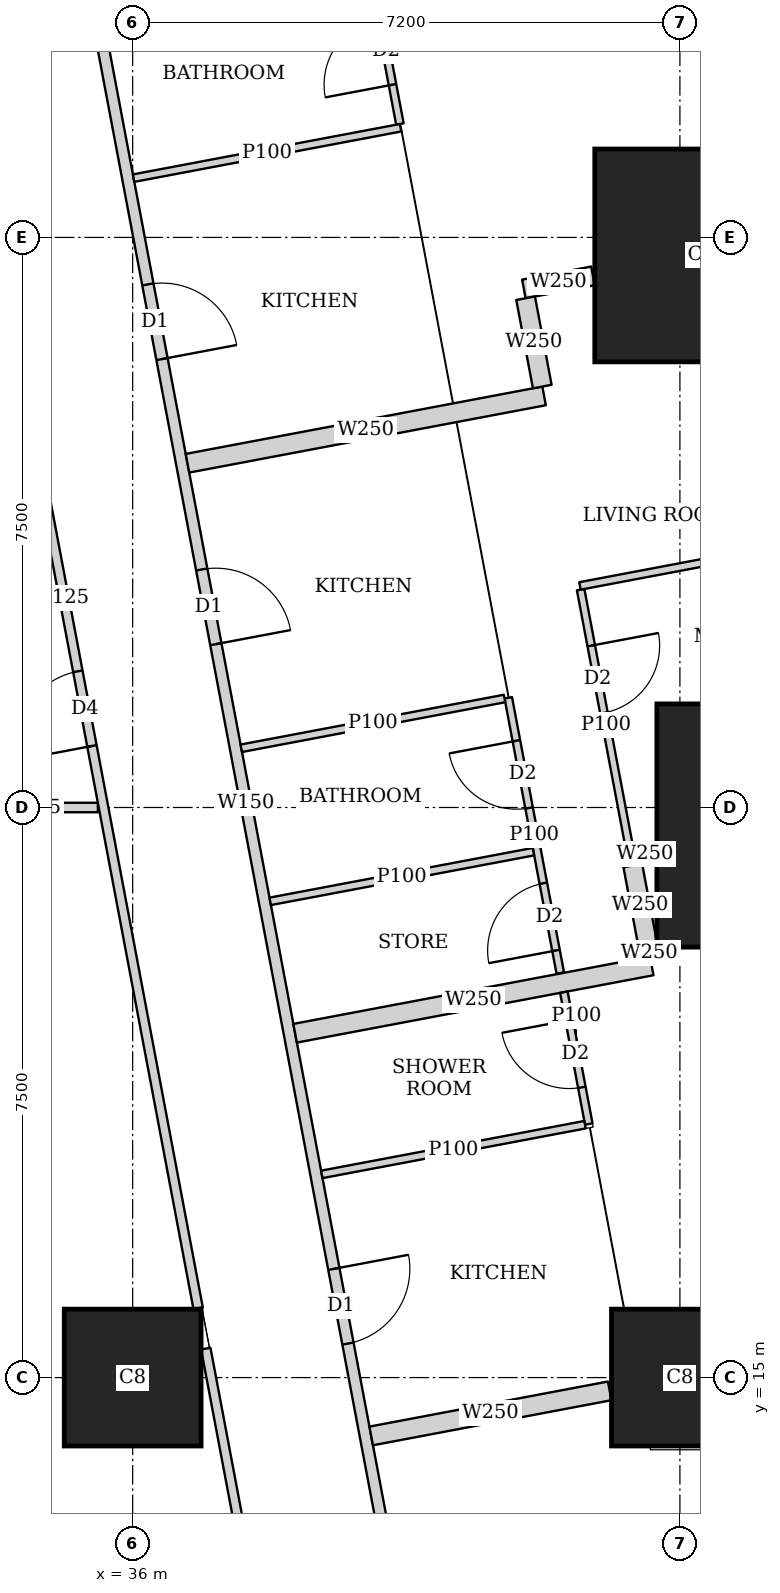
"""IFC4 building model, lengths in metres.
Left out: names, types, materials, properties, quantities, classifications, styles, units other than length and angle.
Written with IfcOpenShell. Run it as: python <this file> out.ifc"""

import sys

from ifc_helpers import new_model, si_unit, direction, frame, frame_2d, origin, origin_2d, place, context, subcontext, project, spatial, rectangle, extrude, element, fill, save


model = new_model("IFC4")
c1 = context("Model", 3, precision=1e-05, world=origin(), true_north=direction((0.0, 1.0)))
c2 = subcontext(c1, "Body", "Model", "MODEL_VIEW")
j1 = project(units=[si_unit("LENGTHUNIT", "METRE"), si_unit("PLANEANGLEUNIT", "RADIAN")], contexts=[c1])
p1 = place(None, origin())
s1 = spatial("IfcSite", under=j1, at=p1, CompositionType="ELEMENT")
p2 = place(p1, origin())
s2 = spatial("IfcBuilding", under=s1, at=p2, CompositionType="ELEMENT")
p3 = place(p2, frame((0.0, 0.0, 65.0)))
s3 = spatial("IfcBuildingStorey", under=s2, at=p3, CompositionType="ELEMENT", Elevation=65.0)
for number, where, z_axis, x_axis in (
    (1, (36.0, 15.0, 0.0), (0.0, 0.0, 1.0), (1.0, 0.0, 0.0)),
    (2, (43.2, 15.0, 0.0), (0.0, 0.0, 1.0), (1.0, 0.0, 0.0)),
):
    element("IfcColumn", number, at=place(p3, frame(where, z_axis=z_axis, x_axis=x_axis)), inside=s3, PredefinedType="COLUMN", context=c2, shape_type="SweptSolid", body=[
        extrude(rectangle(XDim=1.8, YDim=1.8, at=origin_2d()), origin(), (0.0, 0.0, 1.0), 3.75),
    ])
p4 = place(p3, frame((44.697, 22.263, 0.0), z_axis=(0.0, 0.0, 1.0), x_axis=(1.0, 0.0, 0.0)))
e3 = element("IfcColumn", 3, at=p4, inside=s3, PredefinedType="COLUMN", context=c2, shape_type="SweptSolid", body=[
    extrude(rectangle(XDim=3.6, YDim=3.2, at=origin_2d()), origin(), (0.0, 0.0, 1.0), 3.75),
])
p5 = place(p3, frame((43.48, 29.763, 0.0), z_axis=(0.0, 0.0, 1.0), x_axis=(1.0, 0.0, 0.0)))
e4 = element("IfcColumn", 4, at=p5, inside=s3, PredefinedType="COLUMN", context=c2, shape_type="SweptSolid", body=[
    extrude(rectangle(XDim=2.8, YDim=2.8, at=origin_2d()), origin(), (0.0, 0.0, 1.0), 3.75),
])
p6 = place(p3, frame((50.653, 2.703, 0.0), z_axis=(0.0, 0.0, 1.0), x_axis=(-0.185612026696, 0.982623109613, 0.0)))
e5 = element("IfcWall", 5, at=p6, inside=s3, PredefinedType="SOLIDWALL", context=c2, shape_type="SweptSolid", body=[
    extrude(rectangle(XDim=41.393, YDim=0.2, at=frame_2d((20.697, 0.0))), origin(), (0.0, 0.0, 1.0), 3.5),
])
p7 = place(p6, frame((1.633, 0.0, 0.9)))
e6 = element("IfcOpeningElement", 6, at=p7, cuts=e5, PredefinedType="OPENING", context=c2, shape_type="SweptSolid", body=[
    extrude(rectangle(XDim=1.8, YDim=1.5, at=frame_2d((0.9, 0.75))), frame((0.0, 0.11, 0.0), z_axis=(0.0, -1.0, 0.0), x_axis=(1.0, 0.0, 0.0)), (0.0, 0.0, 1.0), 0.22),
])
p8 = place(p6, frame((6.032, 0.0, 0.9)))
e7 = element("IfcOpeningElement", 7, at=p8, cuts=e5, PredefinedType="OPENING", context=c2, shape_type="SweptSolid", body=[
    extrude(rectangle(XDim=1.8, YDim=1.5, at=frame_2d((0.9, 0.75))), frame((0.0, 0.11, 0.0), z_axis=(0.0, -1.0, 0.0), x_axis=(1.0, 0.0, 0.0)), (0.0, 0.0, 1.0), 0.22),
])
p9 = place(p6, frame((9.848, 0.0, 0.9)))
e8 = element("IfcOpeningElement", 8, at=p9, cuts=e5, PredefinedType="OPENING", context=c2, shape_type="SweptSolid", body=[
    extrude(rectangle(XDim=1.8, YDim=1.5, at=frame_2d((0.9, 0.75))), frame((0.0, 0.11, 0.0), z_axis=(0.0, -1.0, 0.0), x_axis=(1.0, 0.0, 0.0)), (0.0, 0.0, 1.0), 0.22),
])
p10 = place(p6, frame((17.481, 0.0, 0.9)))
e9 = element("IfcOpeningElement", 9, at=p10, cuts=e5, PredefinedType="OPENING", context=c2, shape_type="SweptSolid", body=[
    extrude(rectangle(XDim=1.8, YDim=1.5, at=frame_2d((0.9, 0.75))), frame((0.0, 0.11, 0.0), z_axis=(0.0, -1.0, 0.0), x_axis=(1.0, 0.0, 0.0)), (0.0, 0.0, 1.0), 0.22),
])
p11 = place(p6, frame((21.297, 0.0, 0.9)))
e10 = element("IfcOpeningElement", 10, at=p11, cuts=e5, PredefinedType="OPENING", context=c2, shape_type="SweptSolid", body=[
    extrude(rectangle(XDim=1.8, YDim=1.5, at=frame_2d((0.9, 0.75))), frame((0.0, 0.11, 0.0), z_axis=(0.0, -1.0, 0.0), x_axis=(1.0, 0.0, 0.0)), (0.0, 0.0, 1.0), 0.22),
])
p12 = place(p6, frame((25.113, 0.0, 0.9)))
e11 = element("IfcOpeningElement", 11, at=p12, cuts=e5, PredefinedType="OPENING", context=c2, shape_type="SweptSolid", body=[
    extrude(rectangle(XDim=1.8, YDim=1.5, at=frame_2d((0.9, 0.75))), frame((0.0, 0.11, 0.0), z_axis=(0.0, -1.0, 0.0), x_axis=(1.0, 0.0, 0.0)), (0.0, 0.0, 1.0), 0.22),
])
p13 = place(p6, frame((28.93, 0.0, 0.9)))
e12 = element("IfcOpeningElement", 12, at=p13, cuts=e5, PredefinedType="OPENING", context=c2, shape_type="SweptSolid", body=[
    extrude(rectangle(XDim=1.8, YDim=1.5, at=frame_2d((0.9, 0.75))), frame((0.0, 0.11, 0.0), z_axis=(0.0, -1.0, 0.0), x_axis=(1.0, 0.0, 0.0)), (0.0, 0.0, 1.0), 0.22),
])
p14 = place(p6, frame((32.746, 0.0, 0.9)))
e13 = element("IfcOpeningElement", 13, at=p14, cuts=e5, PredefinedType="OPENING", context=c2, shape_type="SweptSolid", body=[
    extrude(rectangle(XDim=1.8, YDim=1.5, at=frame_2d((0.9, 0.75))), frame((0.0, 0.11, 0.0), z_axis=(0.0, -1.0, 0.0), x_axis=(1.0, 0.0, 0.0)), (0.0, 0.0, 1.0), 0.22),
])
p15 = place(p6, frame((36.481, 0.0, 0.9)))
e14 = element("IfcOpeningElement", 14, at=p15, cuts=e5, PredefinedType="OPENING", context=c2, shape_type="SweptSolid", body=[
    extrude(rectangle(XDim=1.8, YDim=1.5, at=frame_2d((0.9, 0.75))), frame((0.0, 0.11, 0.0), z_axis=(0.0, -1.0, 0.0), x_axis=(1.0, 0.0, 0.0)), (0.0, 0.0, 1.0), 0.22),
])
p16 = place(p3, frame((33.68, 42.723, 0.0), z_axis=(0.0, 0.0, 1.0), x_axis=(0.185624129307, -0.98262082342, 0.0)))
e15 = element("IfcWall", 15, at=p16, inside=s3, PredefinedType="SOLIDWALL", context=c2, shape_type="SweptSolid", body=[
    extrude(rectangle(XDim=41.051, YDim=0.15, at=frame_2d((20.526, 0.0))), origin(), (0.0, 0.0, 1.0), 2.5),
])
p17 = place(p16, frame((13.577, 0.0, 0.0)))
e16 = element("IfcOpeningElement", 16, at=p17, cuts=e15, PredefinedType="OPENING", context=c2, shape_type="SweptSolid", body=[
    extrude(rectangle(XDim=1.0, YDim=2.1, at=frame_2d((0.5, 1.05))), frame((0.0, 0.085, 0.0), z_axis=(0.0, -1.0, 0.0), x_axis=(1.0, 0.0, 0.0)), (0.0, 0.0, 1.0), 0.17),
])
p18 = place(p16, frame((17.394, 0.0, 0.0)))
e17 = element("IfcOpeningElement", 17, at=p18, cuts=e15, PredefinedType="OPENING", context=c2, shape_type="SweptSolid", body=[
    extrude(rectangle(XDim=1.0, YDim=2.1, at=frame_2d((0.5, 1.05))), frame((0.0, 0.085, 0.0), z_axis=(0.0, -1.0, 0.0), x_axis=(1.0, 0.0, 0.0)), (0.0, 0.0, 1.0), 0.17),
])
p19 = place(p16, frame((26.758, 0.0, 0.0)))
e18 = element("IfcOpeningElement", 18, at=p19, cuts=e15, PredefinedType="OPENING", context=c2, shape_type="SweptSolid", body=[
    extrude(rectangle(XDim=1.0, YDim=2.1, at=frame_2d((0.5, 1.05))), frame((0.0, 0.085, 0.0), z_axis=(0.0, -1.0, 0.0), x_axis=(1.0, 0.0, 0.0)), (0.0, 0.0, 1.0), 0.17),
])
p20 = place(p16, frame((32.193, 0.0, 0.0)))
e19 = element("IfcOpeningElement", 19, at=p20, cuts=e15, PredefinedType="OPENING", context=c2, shape_type="SweptSolid", body=[
    extrude(rectangle(XDim=1.0, YDim=2.1, at=frame_2d((0.5, 1.05))), frame((0.0, 0.085, 0.0), z_axis=(0.0, -1.0, 0.0), x_axis=(1.0, 0.0, 0.0)), (0.0, 0.0, 1.0), 0.17),
])
p21 = place(p3, frame((37.515, 42.089, 0.0), z_axis=(0.0, 0.0, 1.0), x_axis=(0.185565000991, -0.982631991341, 0.0)))
e20 = element("IfcWall", 20, at=p21, inside=s3, PredefinedType="PARTITIONING", context=c2, shape_type="SweptSolid", body=[
    extrude(rectangle(XDim=10.784, YDim=0.1, at=frame_2d((5.392, 0.0))), origin(), (0.0, 0.0, 1.0), 3.5),
])
p22 = place(p21, frame((9.358, 0.0, 0.0)))
e21 = element("IfcOpeningElement", 21, at=p22, cuts=e20, PredefinedType="OPENING", context=c2, shape_type="SweptSolid", body=[
    extrude(rectangle(XDim=0.9, YDim=2.1, at=frame_2d((0.45, 1.05))), frame((0.0, 0.06, 0.0), z_axis=(0.0, -1.0, 0.0), x_axis=(1.0, 0.0, 0.0)), (0.0, 0.0, 1.0), 0.12),
])
p23 = place(p21, frame((5.173, 0.0, 0.0)))
e22 = element("IfcOpeningElement", 22, at=p23, cuts=e20, PredefinedType="OPENING", context=c2, shape_type="SweptSolid", body=[
    extrude(rectangle(XDim=0.9, YDim=2.1, at=frame_2d((0.45, 1.05))), frame((0.0, 0.06, 0.0), z_axis=(0.0, -1.0, 0.0), x_axis=(1.0, 0.0, 0.0)), (0.0, 0.0, 1.0), 0.12),
])
p24 = place(p21, frame((2.629, 0.0, 0.0)))
e23 = element("IfcOpeningElement", 23, at=p24, cuts=e20, PredefinedType="OPENING", context=c2, shape_type="SweptSolid", body=[
    extrude(rectangle(XDim=0.9, YDim=2.1, at=frame_2d((0.45, 1.05))), frame((0.0, 0.06, 0.0), z_axis=(0.0, -1.0, 0.0), x_axis=(1.0, 0.0, 0.0)), (0.0, 0.0, 1.0), 0.12),
])
p25 = place(p21, frame((7.451, 0.0, 0.0)))
e24 = element("IfcOpeningElement", 24, at=p25, cuts=e20, PredefinedType="OPENING", context=c2, shape_type="SweptSolid", body=[
    extrude(rectangle(XDim=0.9, YDim=2.1, at=frame_2d((0.45, 1.05))), frame((0.0, 0.06, 0.0), z_axis=(0.0, -1.0, 0.0), x_axis=(1.0, 0.0, 0.0)), (0.0, 0.0, 1.0), 0.12),
])
p26 = place(p3, frame((39.525, 31.443, 0.0), z_axis=(0.0, 0.0, 1.0), x_axis=(-0.982648035033, -0.185480023848, 0.0)))
e25 = element("IfcWall", 25, at=p26, inside=s3, PredefinedType="PARTITIONING", context=c2, shape_type="SweptSolid", body=[
    extrude(rectangle(XDim=3.575, YDim=0.1, at=frame_2d((1.788, 0.0))), origin(), (0.0, 0.0, 1.0), 3.5),
])
p27 = place(p3, frame((41.894, 25.366, 0.0), z_axis=(0.0, 0.0, 1.0), x_axis=(0.185611839851, -0.982623144907, 0.0)))
e26 = element("IfcWall", 26, at=p27, inside=s3, PredefinedType="PARTITIONING", context=c2, shape_type="SweptSolid", body=[
    extrude(rectangle(XDim=3.62, YDim=0.1, at=frame_2d((1.81, 0.0))), origin(), (0.0, 0.0, 1.0), 2.5),
])
p28 = place(p27, frame((0.75, 0.0, 0.0)))
e27 = element("IfcOpeningElement", 27, at=p28, cuts=e26, PredefinedType="OPENING", context=c2, shape_type="SweptSolid", body=[
    extrude(rectangle(XDim=0.9, YDim=2.1, at=frame_2d((0.45, 1.05))), frame((0.0, 0.06, 0.0), z_axis=(0.0, -1.0, 0.0), x_axis=(1.0, 0.0, 0.0)), (0.0, 0.0, 1.0), 0.12),
])
p29 = place(p3, frame((40.942, 23.943, 0.0), z_axis=(0.0, 0.0, 1.0), x_axis=(0.185632361754, -0.982619268216, 0.0)))
e28 = element("IfcWall", 28, at=p29, inside=s3, PredefinedType="PARTITIONING", context=c2, shape_type="SweptSolid", body=[
    extrude(rectangle(XDim=3.685, YDim=0.1, at=frame_2d((1.843, 0.0))), origin(), (0.0, 0.0, 1.0), 2.5),
])
p30 = place(p29, frame((0.575, 0.0, 0.0)))
e29 = element("IfcOpeningElement", 29, at=p30, cuts=e28, PredefinedType="OPENING", context=c2, shape_type="SweptSolid", body=[
    extrude(rectangle(XDim=0.9, YDim=2.1, at=frame_2d((0.45, 1.05))), frame((0.0, 0.06, 0.0), z_axis=(0.0, -1.0, 0.0), x_axis=(1.0, 0.0, 0.0)), (0.0, 0.0, 1.0), 0.12),
])
p31 = place(p29, frame((2.483, 0.0, 0.0)))
e30 = element("IfcOpeningElement", 30, at=p31, cuts=e28, PredefinedType="OPENING", context=c2, shape_type="SweptSolid", body=[
    extrude(rectangle(XDim=0.9, YDim=2.1, at=frame_2d((0.45, 1.05))), frame((0.0, 0.06, 0.0), z_axis=(0.0, -1.0, 0.0), x_axis=(1.0, 0.0, 0.0)), (0.0, 0.0, 1.0), 0.12),
])
p32 = place(p3, frame((46.11, 26.213, 0.0), z_axis=(0.0, 0.0, 1.0), x_axis=(-0.982633535512, -0.185556823879, 0.0)))
e31 = element("IfcWall", 31, at=p32, inside=s3, PredefinedType="PARTITIONING", context=c2, shape_type="SweptSolid", body=[
    extrude(rectangle(XDim=4.3, YDim=0.1, at=frame_2d((2.15, 0.0))), origin(), (0.0, 0.0, 1.0), 2.05),
])
p33 = place(p3, frame((40.893, 23.934, 0.0), z_axis=(0.0, 0.0, 1.0), x_axis=(-0.982588017646, -0.185797706064, 0.0)))
e32 = element("IfcWall", 32, at=p33, inside=s3, PredefinedType="PARTITIONING", context=c2, shape_type="SweptSolid", body=[
    extrude(rectangle(XDim=3.525, YDim=0.1, at=frame_2d((1.763, 0.0))), origin(), (0.0, 0.0, 1.0), 3.5),
])
p34 = place(p3, frame((41.273, 21.919, 0.0), z_axis=(0.0, 0.0, 1.0), x_axis=(-0.982636169624, -0.185542874149, 0.0)))
e33 = element("IfcWall", 33, at=p34, inside=s3, PredefinedType="PARTITIONING", context=c2, shape_type="SweptSolid", body=[
    extrude(rectangle(XDim=3.525, YDim=0.1, at=frame_2d((1.763, 0.0))), origin(), (0.0, 0.0, 1.0), 2.5),
])
p35 = place(p3, frame((42.056, 29.494, 0.0), z_axis=(0.0, 0.0, 1.0), x_axis=(-0.982587178881, -0.185802141803, 0.0)))
e34 = element("IfcWall", 34, at=p35, inside=s3, PredefinedType="SOLIDWALL", context=c2, shape_type="SweptSolid", body=[
    extrude(rectangle(XDim=0.925, YDim=0.25, at=frame_2d((0.462, 0.0))), origin(), (0.0, 0.0, 1.0), 2.5),
])
p36 = place(p3, frame((41.413, 27.915, 0.0), z_axis=(0.0, 0.0, 1.0), x_axis=(-0.982635807605, -0.185544791394, 0.0)))
e35 = element("IfcWall", 35, at=p36, inside=s3, PredefinedType="SOLIDWALL", context=c2, shape_type="SweptSolid", body=[
    extrude(rectangle(XDim=4.775, YDim=0.25, at=frame_2d((2.388, 0.0))), origin(), (0.0, 0.0, 1.0), 3.5),
])
p37 = place(p3, frame((41.17, 29.2, 0.0), z_axis=(0.0, 0.0, 1.0), x_axis=(0.185223510709, -0.982696418575, 0.0)))
e36 = element("IfcWall", 36, at=p37, inside=s3, PredefinedType="SOLIDWALL", context=c2, shape_type="SweptSolid", body=[
    extrude(rectangle(XDim=1.182, YDim=0.25, at=frame_2d((0.591, 0.0))), origin(), (0.0, 0.0, 1.0), 2.5),
])
p38 = place(p3, frame((41.673, 20.07, 0.0), z_axis=(0.0, 0.0, 1.0), x_axis=(0.185783379659, -0.98259072652, 0.0)))
e37 = element("IfcWall", 37, at=p38, inside=s3, PredefinedType="PARTITIONING", context=c2, shape_type="SweptSolid", body=[
    extrude(rectangle(XDim=1.765, YDim=0.1, at=frame_2d((0.882, 0.0))), origin(), (0.0, 0.0, 1.0), 3.5),
])
p39 = place(p38, frame((0.374, 0.0, 0.0)))
e38 = element("IfcOpeningElement", 38, at=p39, cuts=e37, PredefinedType="OPENING", context=c2, shape_type="SweptSolid", body=[
    extrude(rectangle(XDim=0.9, YDim=2.1, at=frame_2d((0.45, 1.05))), frame((0.0, 0.06, 0.0), z_axis=(0.0, -1.0, 0.0), x_axis=(1.0, 0.0, 0.0)), (0.0, 0.0, 1.0), 0.12),
])
p40 = place(p3, frame((41.952, 18.327, 0.0), z_axis=(0.0, 0.0, 1.0), x_axis=(-0.982648794755, -0.185475998897, 0.0)))
e39 = element("IfcWall", 39, at=p40, inside=s3, PredefinedType="PARTITIONING", context=c2, shape_type="SweptSolid", body=[
    extrude(rectangle(XDim=3.525, YDim=0.1, at=frame_2d((1.763, 0.0))), origin(), (0.0, 0.0, 1.0), 3.5),
])
p41 = place(p3, frame((42.873, 21.918, 0.0), z_axis=(0.0, 0.0, 1.0), x_axis=(-0.982892522967, -0.184180043152, 0.0)))
e40 = element("IfcWall", 40, at=p41, inside=s3, PredefinedType="SOLIDWALL", context=c2, shape_type="SweptSolid", body=[
    extrude(rectangle(XDim=0.272, YDim=0.25, at=frame_2d((0.136, 0.0))), origin(), (0.0, 0.0, 1.0), 2.5),
])
p42 = place(p3, frame((42.829, 20.416, 0.0), z_axis=(0.0, 0.0, 1.0), x_axis=(-0.982635807605, -0.185544791394, 0.0)))
e41 = element("IfcWall", 41, at=p42, inside=s3, PredefinedType="SOLIDWALL", context=c2, shape_type="SweptSolid", body=[
    extrude(rectangle(XDim=4.775, YDim=0.25, at=frame_2d((2.388, 0.0))), origin(), (0.0, 0.0, 1.0), 3.5),
])
p43 = place(p3, frame((42.58, 21.736, 0.0), z_axis=(0.0, 0.0, 1.0), x_axis=(0.185458925981, -0.982652017132, 0.0)))
e42 = element("IfcWall", 42, at=p43, inside=s3, PredefinedType="SOLIDWALL", context=c2, shape_type="SweptSolid", body=[
    extrude(rectangle(XDim=1.045, YDim=0.25, at=frame_2d((0.522, 0.0))), origin(), (0.0, 0.0, 1.0), 2.5),
])
p44 = place(p3, frame((42.787, 20.639, 0.0), z_axis=(0.0, 0.0, 1.0), x_axis=(0.185013851593, -0.982735913009, 0.0)))
e43 = element("IfcWall", 43, at=p44, inside=s3, PredefinedType="SOLIDWALL", context=c2, shape_type="SweptSolid", body=[
    extrude(rectangle(XDim=0.102, YDim=0.25, at=frame_2d((0.051, 0.0))), origin(), (0.0, 0.0, 1.0), 3.5),
])
p45 = place(p3, frame((42.276, 14.825, 0.0), z_axis=(0.0, 0.0, 1.0), x_axis=(-0.982607211054, -0.185696173318, 0.0)))
e44 = element("IfcWall", 44, at=p45, inside=s3, PredefinedType="SOLIDWALL", context=c2, shape_type="SweptSolid", body=[
    extrude(rectangle(XDim=3.194, YDim=0.25, at=frame_2d((1.597, 0.0))), origin(), (0.0, 0.0, 1.0), 3.5),
])
p46 = place(p3, frame((37.9, 10.413, 0.0), z_axis=(0.0, 0.0, 1.0), x_axis=(-0.185527510388, 0.982639070508, 0.0)))
e45 = element("IfcWall", 45, at=p46, inside=s3, PredefinedType="PARTITIONING", context=c2, shape_type="SweptSolid", body=[
    extrude(rectangle(XDim=5.056, YDim=0.125, at=frame_2d((2.528, 0.0))), origin(), (0.0, 0.0, 1.0), 3.5),
])
p47 = place(p46, frame((0.708, 0.0, 0.0)))
e46 = element("IfcOpeningElement", 46, at=p47, cuts=e45, PredefinedType="OPENING", context=c2, shape_type="SweptSolid", body=[
    extrude(rectangle(XDim=1.0, YDim=2.1, at=frame_2d((0.5, 1.05))), frame((0.0, 0.073, 0.0), z_axis=(0.0, -1.0, 0.0), x_axis=(1.0, 0.0, 0.0)), (0.0, 0.0, 1.0), 0.145),
])
p48 = place(p3, frame((36.861, 15.913, 0.0), z_axis=(0.0, 0.0, 1.0), x_axis=(-0.185588307143, 0.982627589808, 0.0)))
e47 = element("IfcWall", 47, at=p48, inside=s3, PredefinedType="PARTITIONING", context=c2, shape_type="SweptSolid", body=[
    extrude(rectangle(XDim=19.005, YDim=0.125, at=frame_2d((9.502, 0.0))), origin(), (0.0, 0.0, 1.0), 2.5),
])
p49 = place(p48, frame((7.527, 0.0, 0.0)))
e48 = element("IfcOpeningElement", 48, at=p49, cuts=e47, PredefinedType="OPENING", context=c2, shape_type="SweptSolid", body=[
    extrude(rectangle(XDim=1.0, YDim=2.1, at=frame_2d((0.5, 1.05))), frame((0.0, 0.073, 0.0), z_axis=(0.0, -1.0, 0.0), x_axis=(1.0, 0.0, 0.0)), (0.0, 0.0, 1.0), 0.145),
])
p50 = place(p48, frame((15.5, 0.0, 0.0)))
e49 = element("IfcOpeningElement", 49, at=p50, cuts=e47, PredefinedType="OPENING", context=c2, shape_type="SweptSolid", body=[
    extrude(rectangle(XDim=1.0, YDim=2.1, at=frame_2d((0.5, 1.05))), frame((0.0, 0.073, 0.0), z_axis=(0.0, -1.0, 0.0), x_axis=(1.0, 0.0, 0.0)), (0.0, 0.0, 1.0), 0.145),
])
p51 = place(p48, frame((17.602, 0.0, 0.0)))
e50 = element("IfcOpeningElement", 50, at=p51, cuts=e47, PredefinedType="OPENING", context=c2, shape_type="SweptSolid", body=[
    extrude(rectangle(XDim=1.0, YDim=2.1, at=frame_2d((0.5, 1.05))), frame((0.0, 0.073, 0.0), z_axis=(0.0, -1.0, 0.0), x_axis=(1.0, 0.0, 0.0)), (0.0, 0.0, 1.0), 0.145),
])
p52 = place(p3, frame((33.901, 22.5, 0.0), z_axis=(0.0, 0.0, 1.0), x_axis=(1.0, 0.0, 0.0)))
e51 = element("IfcWall", 51, at=p52, inside=s3, PredefinedType="PARTITIONING", context=c2, shape_type="SweptSolid", body=[
    extrude(rectangle(XDim=1.641, YDim=0.125, at=frame_2d((0.821, 0.0))), origin(), (0.0, 0.0, 1.0), 2.5),
])
p53 = place(p22, origin())
e52 = element("IfcDoor", 52, at=p53, inside=s3, OperationType="SINGLE_SWING_LEFT", PredefinedType="DOOR", context=c2, shape_type="SweptSolid", body=[
    extrude(rectangle(XDim=0.9, YDim=2.1, at=frame_2d((0.45, 1.05))), frame((0.0, 0.025, 0.0), z_axis=(0.0, -1.0, 0.0), x_axis=(1.0, 0.0, 0.0)), (0.0, 0.0, 1.0), 0.05),
])
fill(e21, e52)
p54 = place(p17, origin())
e53 = element("IfcDoor", 53, at=p54, inside=s3, OperationType="SINGLE_SWING_RIGHT", PredefinedType="DOOR", context=c2, shape_type="SweptSolid", body=[
    extrude(rectangle(XDim=1.0, YDim=2.1, at=frame_2d((0.5, 1.05))), frame((0.0, 0.025, 0.0), z_axis=(0.0, -1.0, 0.0), x_axis=(1.0, 0.0, 0.0)), (0.0, 0.0, 1.0), 0.05),
])
fill(e16, e53)
p55 = place(p28, origin())
e54 = element("IfcDoor", 54, at=p55, inside=s3, OperationType="SINGLE_SWING_LEFT", PredefinedType="DOOR", context=c2, shape_type="SweptSolid", body=[
    extrude(rectangle(XDim=0.9, YDim=2.1, at=frame_2d((0.45, 1.05))), frame((0.0, 0.025, 0.0), z_axis=(0.0, -1.0, 0.0), x_axis=(1.0, 0.0, 0.0)), (0.0, 0.0, 1.0), 0.05),
])
fill(e27, e54)
p56 = place(p30, origin())
e55 = element("IfcDoor", 55, at=p56, inside=s3, OperationType="SINGLE_SWING_RIGHT", PredefinedType="DOOR", context=c2, shape_type="SweptSolid", body=[
    extrude(rectangle(XDim=0.9, YDim=2.1, at=frame_2d((0.45, 1.05))), frame((0.0, 0.025, 0.0), z_axis=(0.0, -1.0, 0.0), x_axis=(1.0, 0.0, 0.0)), (0.0, 0.0, 1.0), 0.05),
])
fill(e29, e55)
p57 = place(p31, origin())
e56 = element("IfcDoor", 56, at=p57, inside=s3, OperationType="SINGLE_SWING_LEFT", PredefinedType="DOOR", context=c2, shape_type="SweptSolid", body=[
    extrude(rectangle(XDim=0.9, YDim=2.1, at=frame_2d((0.45, 1.05))), frame((0.0, 0.025, 0.0), z_axis=(0.0, -1.0, 0.0), x_axis=(1.0, 0.0, 0.0)), (0.0, 0.0, 1.0), 0.05),
])
fill(e30, e56)
p58 = place(p18, origin())
e57 = element("IfcDoor", 57, at=p58, inside=s3, OperationType="SINGLE_SWING_RIGHT", PredefinedType="DOOR", context=c2, shape_type="SweptSolid", body=[
    extrude(rectangle(XDim=1.0, YDim=2.1, at=frame_2d((0.5, 1.05))), frame((0.0, 0.025, 0.0), z_axis=(0.0, -1.0, 0.0), x_axis=(1.0, 0.0, 0.0)), (0.0, 0.0, 1.0), 0.05),
])
fill(e17, e57)
p59 = place(p39, origin())
e58 = element("IfcDoor", 58, at=p59, inside=s3, OperationType="SINGLE_SWING_RIGHT", PredefinedType="DOOR", context=c2, shape_type="SweptSolid", body=[
    extrude(rectangle(XDim=0.9, YDim=2.1, at=frame_2d((0.45, 1.05))), frame((0.0, 0.025, 0.0), z_axis=(0.0, -1.0, 0.0), x_axis=(1.0, 0.0, 0.0)), (0.0, 0.0, 1.0), 0.05),
])
fill(e38, e58)
p60 = place(p19, origin())
e59 = element("IfcDoor", 59, at=p60, inside=s3, OperationType="SINGLE_SWING_LEFT", PredefinedType="DOOR", context=c2, shape_type="SweptSolid", body=[
    extrude(rectangle(XDim=1.0, YDim=2.1, at=frame_2d((0.5, 1.05))), frame((0.0, 0.025, 0.0), z_axis=(0.0, -1.0, 0.0), x_axis=(1.0, 0.0, 0.0)), (0.0, 0.0, 1.0), 0.05),
])
fill(e18, e59)
p61 = place(p49, origin())
e60 = element("IfcDoor", 60, at=p61, inside=s3, OperationType="SINGLE_SWING_LEFT", PredefinedType="DOOR", context=c2, shape_type="SweptSolid", body=[
    extrude(rectangle(XDim=1.0, YDim=2.1, at=frame_2d((0.5, 1.05))), frame((0.0, 0.025, 0.0), z_axis=(0.0, -1.0, 0.0), x_axis=(1.0, 0.0, 0.0)), (0.0, 0.0, 1.0), 0.05),
])
fill(e48, e60)
save(model, sys.argv[1])
